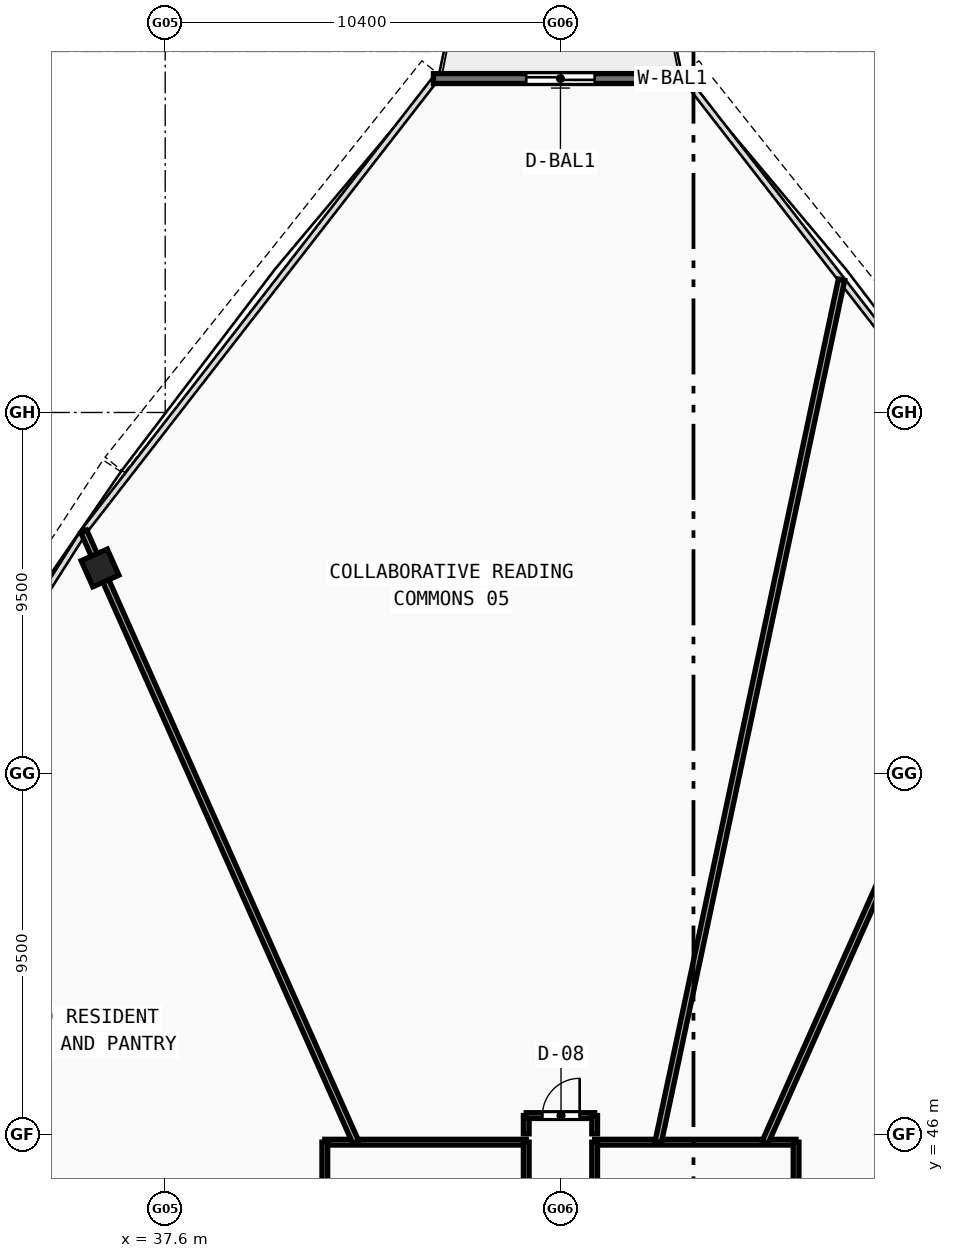
"""IFC4 building model, lengths in metres.
Left out: names, types, materials, properties, quantities, classifications, styles, units other than length and angle.
Written with IfcOpenShell. Run it as: python <this file> out.ifc"""

import sys

from ifc_helpers import new_model, si_unit, direction, frame, frame_2d, origin, origin_with_axes, origin_2d, place, context, subcontext, project, spatial, rectangle, hollow_rectangle, extrude, source, transform, mapped, element, fill, save


model = new_model("IFC4")
c1 = context("Model", 3, precision=1e-05, world=origin(), true_north=direction((0.0, 1.0)))
c2 = subcontext(c1, "Body", "Model", "MODEL_VIEW")
j1 = project(units=[si_unit("LENGTHUNIT", "METRE"), si_unit("PLANEANGLEUNIT", "RADIAN")], contexts=[c1])
p1 = place(None, origin())
s1 = spatial("IfcSite", under=j1, at=p1, CompositionType="ELEMENT")
p2 = place(p1, origin())
s2 = spatial("IfcBuilding", under=s1, at=p2, CompositionType="ELEMENT")
p3 = place(p2, frame((0.0, 0.0, 311.13)))
s3 = spatial("IfcBuildingStorey", under=s2, at=p3, CompositionType="ELEMENT", Elevation=311.13)
m1 = source(origin(), c2, "Body", "SweptSolid", [
    extrude(hollow_rectangle(XDim=0.75, YDim=0.75, WallThickness=0.028, at=origin_2d()), origin(), (0.0, 0.0, 1.0), 3.73),
])
p4 = place(p3, frame((35.886, 60.909, -0.26), z_axis=(0.0, 0.0, 1.0), x_axis=(-0.913545457643, -0.406736643076, 0.0)))
e1 = element("IfcColumn", 1, at=p4, inside=s3, PredefinedType="COLUMN", context=c2, shape_type="MappedRepresentation", body=[
    mapped(m1, transform((0.0, 0.0, 0.0), scale=1.0)),
])
p5 = place(p3, frame((51.341, 73.786, 0.0), z_axis=(0.0, 0.0, 1.0), x_axis=(-1.0, 0.0, 0.0)))
e2 = element("IfcWall", 2, at=p5, inside=s3, PredefinedType="STANDARD", context=c2, shape_type="SweptSolid", body=[
    extrude(rectangle(XDim=6.682, YDim=0.26, at=frame_2d((3.341, 0.0))), origin(), (0.0, 0.0, 1.0), 3.47),
])
p6 = place(p5, frame((2.441, 0.0, 0.0)))
e3 = element("IfcOpeningElement", 3, at=p6, cuts=e2, PredefinedType="OPENING", context=c2, shape_type="SweptSolid", body=[
    extrude(rectangle(XDim=1.8, YDim=2.15, at=frame_2d((0.9, 1.075))), frame((0.0, 0.14, 0.0), z_axis=(0.0, -1.0, 0.0), x_axis=(1.0, 0.0, 0.0)), (0.0, 0.0, 1.0), 0.28),
])
p7 = place(p3, frame((41.8, 45.8, 0.0), z_axis=(0.0, 0.0, 1.0), x_axis=(1.0, 0.0, 0.0)))
e4 = element("IfcWall", 4, at=p7, inside=s3, PredefinedType="PARTITIONING", context=c2, shape_type="SweptSolid", body=[
    extrude(rectangle(XDim=5.3, YDim=0.15, at=frame_2d((2.65, 0.0))), origin(), (0.0, 0.0, 1.0), 2.87),
])
for number, where, z_axis, x_axis in (
    (5, (41.8, 42.2, 0.0), (0.0, 0.0, 1.0), (0.0, 1.0, 0.0)),
    (6, (47.1, 42.2, 0.0), (0.0, 0.0, 1.0), (0.0, 1.0, 0.0)),
):
    element("IfcWall", number, at=place(p3, frame(where, z_axis=z_axis, x_axis=x_axis)), inside=s3, PredefinedType="PARTITIONING", context=c2, shape_type="SweptSolid", body=[
        extrude(rectangle(XDim=3.6, YDim=0.15, at=frame_2d((1.8, 0.0))), origin(), (0.0, 0.0, 1.0), 3.47),
    ])
p8 = place(p3, frame((48.9, 45.8, 0.0), z_axis=(0.0, 0.0, 1.0), x_axis=(1.0, 0.0, 0.0)))
e7 = element("IfcWall", 7, at=p8, inside=s3, PredefinedType="PARTITIONING", context=c2, shape_type="SweptSolid", body=[
    extrude(rectangle(XDim=5.3, YDim=0.15, at=frame_2d((2.65, 0.0))), origin(), (0.0, 0.0, 1.0), 2.87),
])
for number, where, z_axis, x_axis in (
    (8, (48.9, 42.2, 0.0), (0.0, 0.0, 1.0), (0.0, 1.0, 0.0)),
    (9, (54.2, 42.2, 0.0), (0.0, 0.0, 1.0), (0.0, 1.0, 0.0)),
):
    element("IfcWall", number, at=place(p3, frame(where, z_axis=z_axis, x_axis=x_axis)), inside=s3, PredefinedType="PARTITIONING", context=c2, shape_type="SweptSolid", body=[
        extrude(rectangle(XDim=3.6, YDim=0.15, at=frame_2d((1.8, 0.0))), origin(), (0.0, 0.0, 1.0), 3.47),
    ])
p9 = place(p3, frame((53.387, 45.8, 0.0), z_axis=(0.0, 0.0, 1.0), x_axis=(0.406746244391, 0.913541182801, 0.0)))
e10 = element("IfcWall", 10, at=p9, inside=s3, PredefinedType="PARTITIONING", context=c2, shape_type="SweptSolid", body=[
    extrude(rectangle(XDim=17.589, YDim=0.17, at=frame_2d((8.794, 0.0))), origin(), (0.0, 0.0, 1.0), 2.87),
])
p10 = place(p3, frame((50.572, 45.8, 0.0), z_axis=(0.0, 0.0, 1.0), x_axis=(0.207911865665, 0.978147563569, 0.0)))
e11 = element("IfcWall", 11, at=p10, inside=s3, PredefinedType="PARTITIONING", context=c2, shape_type="SweptSolid", body=[
    extrude(rectangle(XDim=23.201, YDim=0.17, at=frame_2d((11.601, 0.0))), origin(), (0.0, 0.0, 1.0), 2.87),
])
p11 = place(p3, frame((42.613, 45.8, 0.0), z_axis=(0.0, 0.0, 1.0), x_axis=(-0.406746244391, 0.913541182801, 0.0)))
e12 = element("IfcWall", 12, at=p11, inside=s3, PredefinedType="PARTITIONING", context=c2, shape_type="SweptSolid", body=[
    extrude(rectangle(XDim=17.589, YDim=0.17, at=frame_2d((8.794, 0.0))), origin(), (0.0, 0.0, 1.0), 2.87),
])
p12 = place(p3, frame((47.1, 46.02, 0.0), z_axis=(0.0, 0.0, 1.0), x_axis=(0.0, 1.0, 0.0)))
e13 = element("IfcWall", 13, at=p12, inside=s3, PredefinedType="PARTITIONING", context=c2, shape_type="SweptSolid", body=[
    extrude(rectangle(XDim=0.48, YDim=0.15, at=frame_2d((0.24, 0.0))), origin(), (0.0, 0.0, 1.0), 3.47),
])
p13 = place(p3, frame((47.1, 46.5, 0.0), z_axis=(0.0, 0.0, 1.0), x_axis=(1.0, 0.0, 0.0)))
e14 = element("IfcWall", 14, at=p13, inside=s3, PredefinedType="PARTITIONING", context=c2, shape_type="SweptSolid", body=[
    extrude(rectangle(XDim=1.8, YDim=0.15, at=frame_2d((0.9, 0.0))), origin(), (0.0, 0.0, 1.0), 3.47),
])
p14 = place(p13, frame((0.425, 0.0, 0.0)))
e15 = element("IfcOpeningElement", 15, at=p14, cuts=e14, PredefinedType="OPENING", context=c2, shape_type="SweptSolid", body=[
    extrude(rectangle(XDim=0.98, YDim=2.12, at=frame_2d((0.49, 1.06))), frame((0.0, 0.085, 0.0), z_axis=(0.0, -1.0, 0.0), x_axis=(1.0, 0.0, 0.0)), (0.0, 0.0, 1.0), 0.17),
])
p15 = place(p3, frame((48.9, 46.5, 0.0), z_axis=(0.0, 0.0, 1.0), x_axis=(0.0, -1.0, 0.0)))
e16 = element("IfcWall", 16, at=p15, inside=s3, PredefinedType="PARTITIONING", context=c2, shape_type="SweptSolid", body=[
    extrude(rectangle(XDim=0.48, YDim=0.15, at=frame_2d((0.24, 0.0))), origin(), (0.0, 0.0, 1.0), 3.47),
])
m2 = source(origin(), c2, "Body", "SweptSolid", [
    extrude(rectangle(XDim=1.8, YDim=2.15, at=frame_2d((0.9, 1.075))), frame((0.0, 0.025, 0.0), z_axis=(0.0, -1.0, 0.0), x_axis=(1.0, 0.0, 0.0)), (0.0, 0.0, 1.0), 0.05),
])
p16 = place(p6, origin_with_axes())
e17 = element("IfcDoor", 17, at=p16, inside=s3, OperationType="DOUBLE_DOOR_SLIDING", PredefinedType="DOOR", context=c2, shape_type="MappedRepresentation", body=[
    mapped(m2, transform((0.0, 0.0, 0.0), scale=1.0)),
])
fill(e3, e17)
m3 = source(origin(), c2, "Body", "SweptSolid", [
    extrude(rectangle(XDim=0.98, YDim=2.12, at=frame_2d((0.49, 1.06))), frame((0.0, 0.025, 0.0), z_axis=(0.0, -1.0, 0.0), x_axis=(1.0, 0.0, 0.0)), (0.0, 0.0, 1.0), 0.05),
])
p17 = place(p14, origin_with_axes())
e18 = element("IfcDoor", 18, at=p17, inside=s3, OperationType="SINGLE_SWING_RIGHT", PredefinedType="DOOR", context=c2, shape_type="MappedRepresentation", body=[
    mapped(m3, transform((0.0, 0.0, 0.0), scale=1.0)),
])
fill(e15, e18)
save(model, sys.argv[1])
